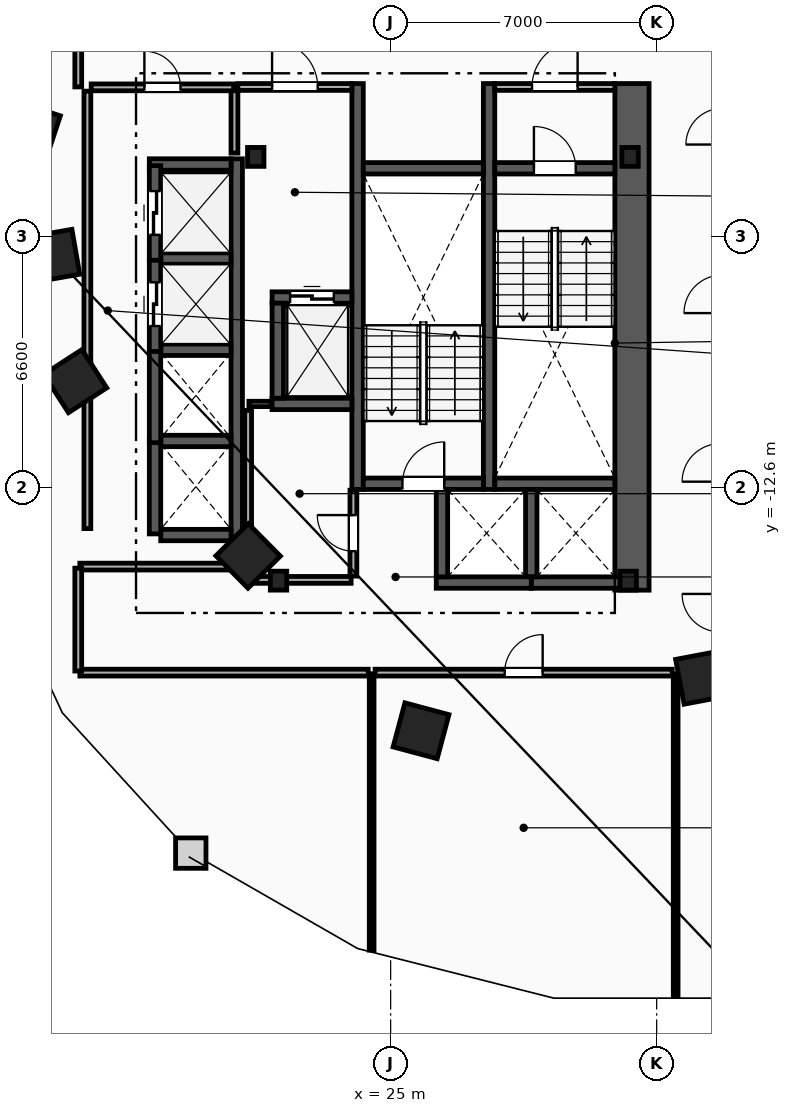
"""IFC4 building model, lengths in metres.
Left out: names, types, materials, properties, quantities, classifications, styles, units other than length and angle.
Written with IfcOpenShell. Run it as: python <this file> out.ifc"""

import sys

from ifc_helpers import new_model, si_unit, direction, frame, frame_2d, origin, origin_2d, place, context, subcontext, project, spatial, rectangle, i_section, extrude, element, fill, save


model = new_model("IFC4")
c1 = context("Model", 3, precision=1e-05, world=origin(), true_north=direction((0.0, 1.0)))
c2 = subcontext(c1, "Body", "Model", "MODEL_VIEW")
j1 = project(units=[si_unit("LENGTHUNIT", "METRE"), si_unit("PLANEANGLEUNIT", "RADIAN")], contexts=[c1])
p1 = place(None, origin())
s1 = spatial("IfcSite", under=j1, at=p1, CompositionType="ELEMENT")
p2 = place(p1, origin())
s2 = spatial("IfcBuilding", under=s1, at=p2, CompositionType="ELEMENT")
p3 = place(p2, frame((0.0, 0.0, 65.8)))
s3 = spatial("IfcBuildingStorey", under=s2, at=p3, CompositionType="ELEMENT", Elevation=65.8)
for number, where, z_axis, x_axis in (
    (1, (31.3, -3.9, 0.0), (0.0, 0.0, 1.0), (1.0, 0.0, 0.0)),
    (2, (21.45, -3.9, 0.0), (0.0, 0.0, 1.0), (1.0, 0.0, 0.0)),
    (3, (22.05, -15.05, 0.0), (0.0, 0.0, 1.0), (1.0, 0.0, 0.0)),
    (4, (31.25, -15.05, 0.0), (0.0, 0.0, 1.0), (1.0, 0.0, 0.0)),
):
    element("IfcColumn", number, at=place(p3, frame(where, z_axis=z_axis, x_axis=x_axis)), inside=s3, PredefinedType="COLUMN", context=c2, shape_type="SweptSolid", body=[
        extrude(i_section(OverallWidth=0.432, OverallDepth=0.498, WebThickness=0.056, FlangeThickness=0.089, FilletRadius=0.018, at=origin_2d()), origin(), (0.0, 0.0, 1.0), 3.8),
    ])
for number, where, z_axis, x_axis in (
    (5, (15.55, -3.2, 0.0), (0.0, 0.0, 1.0), (-0.315, -0.949, 0.0)),
    (6, (16.125, -6.5, 0.0), (0.0, 0.0, 1.0), (0.172, -0.985, 0.0)),
    (7, (16.7, -9.8, 0.0), (0.0, 0.0, 1.0), (0.544, -0.839, 0.0)),
    (8, (21.25, -14.4, 0.0), (0.0, 0.0, 1.0), (0.703, -0.711, 0.0)),
    (9, (25.8, -19.0, 0.0), (0.0, 0.0, 1.0), (0.966, -0.259, 0.0)),
    (10, (33.2, -17.6, 0.0), (0.0, 0.0, 1.0), (0.983, 0.186, 0.0)),
):
    element("IfcColumn", number, at=place(p3, frame(where, z_axis=z_axis, x_axis=x_axis)), inside=s3, PredefinedType="COLUMN", context=c2, shape_type="SweptSolid", body=[
        extrude(rectangle(XDim=1.2, YDim=1.2, at=origin_2d()), origin(), (0.0, 0.0, 1.0), 3.8),
    ])
p4 = place(p3, frame((31.35, -15.3, 0.0), z_axis=(0.0, 0.0, 1.0), x_axis=(0.0, 1.0, 0.0)))
e11 = element("IfcWall", 11, at=p4, inside=s3, PredefinedType="SHEAR", context=c2, shape_type="SweptSolid", body=[
    extrude(rectangle(XDim=13.33, YDim=0.9, at=frame_2d((6.665, 0.0))), origin(), (0.0, 0.0, 1.0), 3.5),
])
for number, where, z_axis, x_axis in (
    (12, (27.59, -12.65, 0.0), (0.0, 0.0, 1.0), (0.0, 1.0, 0.0)),
    (13, (24.13, -12.65, 0.0), (0.0, 0.0, 1.0), (0.0, 1.0, 0.0)),
):
    element("IfcWall", number, at=place(p3, frame(where, z_axis=z_axis, x_axis=x_axis)), inside=s3, PredefinedType="SHEAR", context=c2, shape_type="SweptSolid", body=[
        extrude(rectangle(XDim=10.68, YDim=0.3, at=frame_2d((5.34, 0.0))), origin(), (0.0, 0.0, 1.0), 3.5),
    ])
p5 = place(p3, frame((27.74, -4.2, 0.0), z_axis=(0.0, 0.0, 1.0), x_axis=(1.0, 0.0, 0.0)))
e14 = element("IfcWall", 14, at=p5, inside=s3, PredefinedType="SHEAR", context=c2, shape_type="SweptSolid", body=[
    extrude(rectangle(XDim=3.16, YDim=0.3, at=frame_2d((1.58, 0.0))), origin(), (0.0, 0.0, 1.0), 3.5),
])
p6 = place(p5, frame((1.03, 0.0, 0.0)))
e15 = element("IfcOpeningElement", 15, at=p6, cuts=e14, PredefinedType="OPENING", context=c2, shape_type="SweptSolid", body=[
    extrude(rectangle(XDim=1.1, YDim=2.15, at=frame_2d((0.55, 1.075))), frame((0.0, 0.16, 0.0), z_axis=(0.0, -1.0, 0.0), x_axis=(1.0, 0.0, 0.0)), (0.0, 0.0, 1.0), 0.32),
])
p7 = place(p3, frame((27.74, -12.5, 0.0), z_axis=(0.0, 0.0, 1.0), x_axis=(1.0, 0.0, 0.0)))
e16 = element("IfcWall", 16, at=p7, inside=s3, PredefinedType="SHEAR", context=c2, shape_type="SweptSolid", body=[
    extrude(rectangle(XDim=3.16, YDim=0.3, at=frame_2d((1.58, 0.0))), origin(), (0.0, 0.0, 1.0), 3.5),
])
p8 = place(p3, frame((24.28, -12.5, 0.0), z_axis=(0.0, 0.0, 1.0), x_axis=(1.0, 0.0, 0.0)))
e17 = element("IfcWall", 17, at=p8, inside=s3, PredefinedType="SHEAR", context=c2, shape_type="SweptSolid", body=[
    extrude(rectangle(XDim=3.16, YDim=0.3, at=frame_2d((1.58, 0.0))), origin(), (0.0, 0.0, 1.0), 3.5),
])
p9 = place(p8, frame((1.03, 0.0, 0.0)))
e18 = element("IfcOpeningElement", 18, at=p9, cuts=e17, PredefinedType="OPENING", context=c2, shape_type="SweptSolid", body=[
    extrude(rectangle(XDim=1.1, YDim=2.15, at=frame_2d((0.55, 1.075))), frame((0.0, 0.16, 0.0), z_axis=(0.0, -1.0, 0.0), x_axis=(1.0, 0.0, 0.0)), (0.0, 0.0, 1.0), 0.32),
])
p10 = place(p3, frame((24.28, -4.2, 0.0), z_axis=(0.0, 0.0, 1.0), x_axis=(1.0, 0.0, 0.0)))
e19 = element("IfcWall", 19, at=p10, inside=s3, PredefinedType="SHEAR", context=c2, shape_type="SweptSolid", body=[
    extrude(rectangle(XDim=3.16, YDim=0.3, at=frame_2d((1.58, 0.0))), origin(), (0.0, 0.0, 1.0), 3.5),
])
p11 = place(p3, frame((20.89, -3.8, 0.0), z_axis=(0.0, 0.0, 1.0), x_axis=(0.0, 1.0, 0.0)))
e20 = element("IfcWall", 20, at=p11, inside=s3, PredefinedType="PARTITIONING", context=c2, shape_type="SweptSolid", body=[
    extrude(rectangle(XDim=1.65, YDim=0.18, at=frame_2d((0.825, 0.0))), origin(), (0.0, 0.0, 1.0), 3.5),
])
p12 = place(p3, frame((20.98, -2.06, 0.0), z_axis=(0.0, 0.0, 1.0), x_axis=(1.0, 0.0, 0.0)))
e21 = element("IfcWall", 21, at=p12, inside=s3, PredefinedType="PARTITIONING", context=c2, shape_type="SweptSolid", body=[
    extrude(rectangle(XDim=3.0, YDim=0.18, at=frame_2d((1.5, 0.0))), origin(), (0.0, 0.0, 1.0), 3.5),
])
p13 = place(p12, frame((0.9, 0.0, 0.0)))
e22 = element("IfcOpeningElement", 22, at=p13, cuts=e21, PredefinedType="OPENING", context=c2, shape_type="SweptSolid", body=[
    extrude(rectangle(XDim=1.2, YDim=2.15, at=frame_2d((0.6, 1.075))), frame((0.0, 0.1, 0.0), z_axis=(0.0, -1.0, 0.0), x_axis=(1.0, 0.0, 0.0)), (0.0, 0.0, 1.0), 0.2),
])
p14 = place(p3, frame((27.74, -2.06, 0.0), z_axis=(0.0, 0.0, 1.0), x_axis=(1.0, 0.0, 0.0)))
e23 = element("IfcWall", 23, at=p14, inside=s3, PredefinedType="PARTITIONING", context=c2, shape_type="SweptSolid", body=[
    extrude(rectangle(XDim=3.16, YDim=0.18, at=frame_2d((1.58, 0.0))), origin(), (0.0, 0.0, 1.0), 3.5),
])
p15 = place(p14, frame((0.98, 0.0, 0.0)))
e24 = element("IfcOpeningElement", 24, at=p15, cuts=e23, PredefinedType="OPENING", context=c2, shape_type="SweptSolid", body=[
    extrude(rectangle(XDim=1.2, YDim=2.15, at=frame_2d((0.6, 1.075))), frame((0.0, 0.1, 0.0), z_axis=(0.0, -1.0, 0.0), x_axis=(1.0, 0.0, 0.0)), (0.0, 0.0, 1.0), 0.2),
])
p16 = place(p3, frame((21.88, -7.6, 0.0), z_axis=(0.0, 0.0, 1.0), x_axis=(1.0, 0.0, 0.0)))
e25 = element("IfcWall", 25, at=p16, inside=s3, PredefinedType="SHEAR", context=c2, shape_type="SweptSolid", body=[
    extrude(rectangle(XDim=2.1, YDim=0.3, at=frame_2d((1.05, 0.0))), origin(), (0.0, 0.0, 1.0), 3.5),
])
p17 = place(p16, frame((0.475, 0.0, 0.0)))
e26 = element("IfcOpeningElement", 26, at=p17, cuts=e25, PredefinedType="OPENING", context=c2, shape_type="SweptSolid", body=[
    extrude(rectangle(XDim=1.15, YDim=2.2, at=frame_2d((0.575, 1.1))), frame((0.0, 0.16, 0.0), z_axis=(0.0, -1.0, 0.0), x_axis=(1.0, 0.0, 0.0)), (0.0, 0.0, 1.0), 0.32),
])
p18 = place(p3, frame((21.88, -10.4, 0.0), z_axis=(0.0, 0.0, 1.0), x_axis=(1.0, 0.0, 0.0)))
e27 = element("IfcWall", 27, at=p18, inside=s3, PredefinedType="SHEAR", context=c2, shape_type="SweptSolid", body=[
    extrude(rectangle(XDim=2.1, YDim=0.3, at=frame_2d((1.05, 0.0))), origin(), (0.0, 0.0, 1.0), 3.5),
])
for number, where, z_axis, x_axis in (
    (28, (22.03, -10.25, 0.0), (0.0, 0.0, 1.0), (0.0, 1.0, 0.0)),
    (29, (28.7, -15.1, 0.0), (0.0, 0.0, 1.0), (1.0, 0.0, 0.0)),
):
    element("IfcWall", number, at=place(p3, frame(where, z_axis=z_axis, x_axis=x_axis)), inside=s3, PredefinedType="SHEAR", context=c2, shape_type="SweptSolid", body=[
        extrude(rectangle(XDim=2.5, YDim=0.3, at=frame_2d((1.25, 0.0))), origin(), (0.0, 0.0, 1.0), 3.5),
    ])
p19 = place(p3, frame((28.7, -14.95, 0.0), z_axis=(0.0, 0.0, 1.0), x_axis=(0.0, 1.0, 0.0)))
e30 = element("IfcWall", 30, at=p19, inside=s3, PredefinedType="SHEAR", context=c2, shape_type="SweptSolid", body=[
    extrude(rectangle(XDim=2.3, YDim=0.3, at=frame_2d((1.15, 0.0))), origin(), (0.0, 0.0, 1.0), 3.5),
])
p20 = place(p3, frame((26.2, -15.1, 0.0), z_axis=(0.0, 0.0, 1.0), x_axis=(1.0, 0.0, 0.0)))
e31 = element("IfcWall", 31, at=p20, inside=s3, PredefinedType="SHEAR", context=c2, shape_type="SweptSolid", body=[
    extrude(rectangle(XDim=2.5, YDim=0.3, at=frame_2d((1.25, 0.0))), origin(), (0.0, 0.0, 1.0), 3.5),
])
p21 = place(p3, frame((26.35, -14.95, 0.0), z_axis=(0.0, 0.0, 1.0), x_axis=(0.0, 1.0, 0.0)))
e32 = element("IfcWall", 32, at=p21, inside=s3, PredefinedType="SHEAR", context=c2, shape_type="SweptSolid", body=[
    extrude(rectangle(XDim=2.3, YDim=0.3, at=frame_2d((1.15, 0.0))), origin(), (0.0, 0.0, 1.0), 3.5),
])
p22 = place(p3, frame((20.95, -14.0, 0.0), z_axis=(0.0, 0.0, 1.0), x_axis=(0.0, 1.0, 0.0)))
e33 = element("IfcWall", 33, at=p22, inside=s3, PredefinedType="SHEAR", context=c2, shape_type="SweptSolid", body=[
    extrude(rectangle(XDim=10.05, YDim=0.3, at=frame_2d((5.025, 0.0))), origin(), (0.0, 0.0, 1.0), 3.5),
])
p23 = place(p3, frame((18.95, -13.85, 0.0), z_axis=(0.0, 0.0, 1.0), x_axis=(1.0, 0.0, 0.0)))
e34 = element("IfcWall", 34, at=p23, inside=s3, PredefinedType="SHEAR", context=c2, shape_type="SweptSolid", body=[
    extrude(rectangle(XDim=1.85, YDim=0.3, at=frame_2d((0.925, 0.0))), origin(), (0.0, 0.0, 1.0), 3.5),
])
p24 = place(p3, frame((18.65, -4.1, 0.0), z_axis=(0.0, 0.0, 1.0), x_axis=(1.0, 0.0, 0.0)))
e35 = element("IfcWall", 35, at=p24, inside=s3, PredefinedType="SHEAR", context=c2, shape_type="SweptSolid", body=[
    extrude(rectangle(XDim=2.15, YDim=0.3, at=frame_2d((1.075, 0.0))), origin(), (0.0, 0.0, 1.0), 3.5),
])
for number, where, z_axis, x_axis in (
    (36, (18.95, -11.375, 0.0), (0.0, 0.0, 1.0), (1.0, 0.0, 0.0)),
    (37, (18.95, -8.975, 0.0), (0.0, 0.0, 1.0), (1.0, 0.0, 0.0)),
    (38, (18.95, -6.575, 0.0), (0.0, 0.0, 1.0), (1.0, 0.0, 0.0)),
):
    element("IfcWall", number, at=place(p3, frame(where, z_axis=z_axis, x_axis=x_axis)), inside=s3, PredefinedType="SHEAR", context=c2, shape_type="SweptSolid", body=[
        extrude(rectangle(XDim=1.85, YDim=0.3, at=frame_2d((0.925, 0.0))), origin(), (0.0, 0.0, 1.0), 3.5),
    ])
for number, where, z_axis, x_axis in (
    (39, (18.8, -13.82, 0.0), (0.0, 0.0, 1.0), (0.0, 1.0, 0.0)),
    (40, (18.8, -11.42, 0.0), (0.0, 0.0, 1.0), (0.0, 1.0, 0.0)),
):
    element("IfcWall", number, at=place(p3, frame(where, z_axis=z_axis, x_axis=x_axis)), inside=s3, PredefinedType="SHEAR", context=c2, shape_type="SweptSolid", body=[
        extrude(rectangle(XDim=2.49, YDim=0.3, at=frame_2d((1.245, 0.0))), origin(), (0.0, 0.0, 1.0), 3.5),
    ])
p25 = place(p3, frame((18.8, -9.02, 0.0), z_axis=(0.0, 0.0, 1.0), x_axis=(0.0, 1.0, 0.0)))
e41 = element("IfcWall", 41, at=p25, inside=s3, PredefinedType="SHEAR", context=c2, shape_type="SweptSolid", body=[
    extrude(rectangle(XDim=2.49, YDim=0.3, at=frame_2d((1.245, 0.0))), origin(), (0.0, 0.0, 1.0), 3.5),
])
p26 = place(p25, frame((0.67, 0.0, 0.0)))
e42 = element("IfcOpeningElement", 42, at=p26, cuts=e41, PredefinedType="OPENING", context=c2, shape_type="SweptSolid", body=[
    extrude(rectangle(XDim=1.15, YDim=2.2, at=frame_2d((0.575, 1.1))), frame((0.0, 0.16, 0.0), z_axis=(0.0, -1.0, 0.0), x_axis=(1.0, 0.0, 0.0)), (0.0, 0.0, 1.0), 0.32),
])
p27 = place(p3, frame((18.8, -6.62, 0.0), z_axis=(0.0, 0.0, 1.0), x_axis=(0.0, 1.0, 0.0)))
e43 = element("IfcWall", 43, at=p27, inside=s3, PredefinedType="SHEAR", context=c2, shape_type="SweptSolid", body=[
    extrude(rectangle(XDim=2.49, YDim=0.3, at=frame_2d((1.245, 0.0))), origin(), (0.0, 0.0, 1.0), 3.5),
])
p28 = place(p27, frame((0.67, 0.0, 0.0)))
e44 = element("IfcOpeningElement", 44, at=p28, cuts=e43, PredefinedType="OPENING", context=c2, shape_type="SweptSolid", body=[
    extrude(rectangle(XDim=1.15, YDim=2.2, at=frame_2d((0.575, 1.1))), frame((0.0, 0.16, 0.0), z_axis=(0.0, -1.0, 0.0), x_axis=(1.0, 0.0, 0.0)), (0.0, 0.0, 1.0), 0.32),
])
p29 = place(p3, frame((17.02, -13.68, 0.0), z_axis=(0.0, 0.0, 1.0), x_axis=(0.0, 1.0, 0.0)))
e45 = element("IfcWall", 45, at=p29, inside=s3, PredefinedType="PARTITIONING", context=c2, shape_type="SweptSolid", body=[
    extrude(rectangle(XDim=11.51, YDim=0.18, at=frame_2d((5.755, 0.0))), origin(), (0.0, 0.0, 1.0), 3.5),
])
p30 = place(p3, frame((17.12, -2.07, 0.0), z_axis=(0.0, 0.0, 1.0), x_axis=(1.0, 0.0, 0.0)))
e46 = element("IfcWall", 46, at=p30, inside=s3, PredefinedType="PARTITIONING", context=c2, shape_type="SweptSolid", body=[
    extrude(rectangle(XDim=3.75, YDim=0.18, at=frame_2d((1.875, 0.0))), origin(), (0.0, 0.0, 1.0), 3.5),
])
p31 = place(p30, frame((1.4, 0.0, 0.0)))
e47 = element("IfcOpeningElement", 47, at=p31, cuts=e46, PredefinedType="OPENING", context=c2, shape_type="SweptSolid", body=[
    extrude(rectangle(XDim=0.95, YDim=2.1, at=frame_2d((0.475, 1.05))), frame((0.0, 0.1, 0.0), z_axis=(0.0, -1.0, 0.0), x_axis=(1.0, 0.0, 0.0)), (0.0, 0.0, 1.0), 0.2),
])
p32 = place(p3, frame((21.27, -10.4, 0.0), z_axis=(0.0, 0.0, 1.0), x_axis=(1.0, 0.0, 0.0)))
e48 = element("IfcWall", 48, at=p32, inside=s3, PredefinedType="PARTITIONING", context=c2, shape_type="SweptSolid", body=[
    extrude(rectangle(XDim=0.59, YDim=0.14, at=frame_2d((0.295, 0.0))), origin(), (0.0, 0.0, 1.0), 3.5),
])
p33 = place(p3, frame((21.25, -14.93, 0.0), z_axis=(0.0, 0.0, 1.0), x_axis=(0.0, 1.0, 0.0)))
e49 = element("IfcWall", 49, at=p33, inside=s3, PredefinedType="PARTITIONING", context=c2, shape_type="SweptSolid", body=[
    extrude(rectangle(XDim=4.36, YDim=0.18, at=frame_2d((2.18, 0.0))), origin(), (0.0, 0.0, 1.0), 3.5),
])
p34 = place(p3, frame((21.35, -15.03, 0.0), z_axis=(0.0, 0.0, 1.0), x_axis=(1.0, 0.0, 0.0)))
e50 = element("IfcWall", 50, at=p34, inside=s3, PredefinedType="PARTITIONING", context=c2, shape_type="SweptSolid", body=[
    extrude(rectangle(XDim=2.61, YDim=0.18, at=frame_2d((1.305, 0.0))), origin(), (0.0, 0.0, 1.0), 2.573),
])
p35 = place(p3, frame((24.02, -14.93, 0.0), z_axis=(0.0, 0.0, 1.0), x_axis=(0.0, 1.0, 0.0)))
e51 = element("IfcWall", 51, at=p35, inside=s3, PredefinedType="PARTITIONING", context=c2, shape_type="SweptSolid", body=[
    extrude(rectangle(XDim=2.26, YDim=0.18, at=frame_2d((1.13, 0.0))), origin(), (0.0, 0.0, 1.0), 3.5),
])
p36 = place(p35, frame((0.655, 0.0, 0.0)))
e52 = element("IfcOpeningElement", 52, at=p36, cuts=e51, PredefinedType="OPENING", context=c2, shape_type="SweptSolid", body=[
    extrude(rectangle(XDim=0.95, YDim=2.1, at=frame_2d((0.475, 1.05))), frame((0.0, 0.1, 0.0), z_axis=(0.0, -1.0, 0.0), x_axis=(1.0, 0.0, 0.0)), (0.0, 0.0, 1.0), 0.2),
])
p37 = place(p3, frame((24.5, -24.772, 0.0), z_axis=(0.0, 0.0, 1.0), x_axis=(0.0, 1.0, 0.0)))
e53 = element("IfcWall", 53, at=p37, inside=s3, PredefinedType="PARTITIONING", context=c2, shape_type="SweptSolid", body=[
    extrude(rectangle(XDim=7.272, YDim=0.125, at=frame_2d((3.636, 0.0))), origin(), (0.0, 0.0, 1.0), 3.5),
])
p38 = place(p3, frame((32.5, -25.985, 0.0), z_axis=(0.0, 0.0, 1.0), x_axis=(0.0, 1.0, 0.0)))
e54 = element("IfcWall", 54, at=p38, inside=s3, PredefinedType="PARTITIONING", context=c2, shape_type="SweptSolid", body=[
    extrude(rectangle(XDim=8.485, YDim=0.125, at=frame_2d((4.243, 0.0))), origin(), (0.0, 0.0, 1.0), 3.5),
])
p39 = place(p3, frame((24.59, -17.47, 0.0), z_axis=(0.0, 0.0, 1.0), x_axis=(1.0, 0.0, 0.0)))
e55 = element("IfcWall", 55, at=p39, inside=s3, PredefinedType="PARTITIONING", context=c2, shape_type="SweptSolid", body=[
    extrude(rectangle(XDim=7.82, YDim=0.18, at=frame_2d((3.91, 0.0))), origin(), (0.0, 0.0, 1.0), 3.5),
])
p40 = place(p39, frame((3.41, 0.0, 0.0)))
e56 = element("IfcOpeningElement", 56, at=p40, cuts=e55, PredefinedType="OPENING", context=c2, shape_type="SweptSolid", body=[
    extrude(rectangle(XDim=1.0, YDim=2.15, at=frame_2d((0.5, 1.075))), frame((0.0, 0.1, 0.0), z_axis=(0.0, -1.0, 0.0), x_axis=(1.0, 0.0, 0.0)), (0.0, 0.0, 1.0), 0.2),
])
p41 = place(p3, frame((32.59, -17.47, 0.0), z_axis=(0.0, 0.0, 1.0), x_axis=(1.0, 0.0, 0.0)))
e57 = element("IfcWall", 57, at=p41, inside=s3, PredefinedType="PARTITIONING", context=c2, shape_type="SweptSolid", body=[
    extrude(rectangle(XDim=1.038, YDim=0.18, at=frame_2d((0.519, 0.0))), origin(), (0.0, 0.0, 1.0), 3.5),
])
p42 = place(p3, frame((16.822, -17.47, 0.0), z_axis=(0.0, 0.0, 1.0), x_axis=(1.0, 0.0, 0.0)))
e58 = element("IfcWall", 58, at=p42, inside=s3, PredefinedType="PARTITIONING", context=c2, shape_type="SweptSolid", body=[
    extrude(rectangle(XDim=7.588, YDim=0.18, at=frame_2d((3.794, 0.0))), origin(), (0.0, 0.0, 1.0), 3.5),
])
p43 = place(p3, frame((21.178, -14.68, 0.0), z_axis=(0.0, 0.0, 1.0), x_axis=(-1.0, 0.0, 0.0)))
e59 = element("IfcWall", 59, at=p43, inside=s3, PredefinedType="PARTITIONING", context=c2, shape_type="SweptSolid", body=[
    extrude(rectangle(XDim=4.357, YDim=0.18, at=frame_2d((2.178, 0.0))), origin(), (0.0, 0.0, 1.0), 3.5),
])
p44 = place(p3, frame((16.78, -14.721, 0.0), z_axis=(0.0, 0.0, 1.0), x_axis=(0.0, -1.0, 0.0)))
e60 = element("IfcWall", 60, at=p44, inside=s3, PredefinedType="PARTITIONING", context=c2, shape_type="SweptSolid", body=[
    extrude(rectangle(XDim=2.707, YDim=0.18, at=frame_2d((1.354, 0.0))), origin(), (0.0, 0.0, 1.0), 3.5),
])
p45 = place(p3, frame((16.78, 0.329, 0.0), z_axis=(0.0, 0.0, 1.0), x_axis=(0.0, -1.0, 0.0)))
e61 = element("IfcWall", 61, at=p45, inside=s3, PredefinedType="PARTITIONING", context=c2, shape_type="SweptSolid", body=[
    extrude(rectangle(XDim=2.387, YDim=0.18, at=frame_2d((1.194, 0.0))), origin(), (0.0, 0.0, 1.0), 3.5),
])
p46 = place(p6, origin())
e62 = element("IfcDoor", 62, at=p46, inside=s3, OperationType="SINGLE_SWING_LEFT", PredefinedType="DOOR", context=c2, shape_type="SweptSolid", body=[
    extrude(rectangle(XDim=1.1, YDim=2.15, at=frame_2d((0.55, 1.075))), frame((0.0, 0.025, 0.0), z_axis=(0.0, -1.0, 0.0), x_axis=(1.0, 0.0, 0.0)), (0.0, 0.0, 1.0), 0.05),
])
fill(e15, e62)
p47 = place(p9, origin())
e63 = element("IfcDoor", 63, at=p47, inside=s3, OperationType="SINGLE_SWING_RIGHT", PredefinedType="DOOR", context=c2, shape_type="SweptSolid", body=[
    extrude(rectangle(XDim=1.1, YDim=2.15, at=frame_2d((0.55, 1.075))), frame((0.0, 0.025, 0.0), z_axis=(0.0, -1.0, 0.0), x_axis=(1.0, 0.0, 0.0)), (0.0, 0.0, 1.0), 0.05),
])
fill(e18, e63)
p48 = place(p13, origin())
e64 = element("IfcDoor", 64, at=p48, inside=s3, OperationType="SINGLE_SWING_LEFT", PredefinedType="DOOR", context=c2, shape_type="SweptSolid", body=[
    extrude(rectangle(XDim=1.2, YDim=2.15, at=frame_2d((0.6, 1.075))), frame((0.0, 0.025, 0.0), z_axis=(0.0, -1.0, 0.0), x_axis=(1.0, 0.0, 0.0)), (0.0, 0.0, 1.0), 0.05),
])
fill(e22, e64)
p49 = place(p15, origin())
e65 = element("IfcDoor", 65, at=p49, inside=s3, OperationType="SINGLE_SWING_RIGHT", PredefinedType="DOOR", context=c2, shape_type="SweptSolid", body=[
    extrude(rectangle(XDim=1.2, YDim=2.15, at=frame_2d((0.6, 1.075))), frame((0.0, 0.025, 0.0), z_axis=(0.0, -1.0, 0.0), x_axis=(1.0, 0.0, 0.0)), (0.0, 0.0, 1.0), 0.05),
])
fill(e24, e65)
p50 = place(p17, origin())
e66 = element("IfcDoor", 66, at=p50, inside=s3, OperationType="SLIDING_TO_LEFT", PredefinedType="TRAPDOOR", context=c2, shape_type="SweptSolid", body=[
    extrude(rectangle(XDim=1.15, YDim=2.2, at=frame_2d((0.575, 1.1))), frame((0.0, 0.025, 0.0), z_axis=(0.0, -1.0, 0.0), x_axis=(1.0, 0.0, 0.0)), (0.0, 0.0, 1.0), 0.05),
])
fill(e26, e66)
p51 = place(p26, origin())
e67 = element("IfcDoor", 67, at=p51, inside=s3, OperationType="SLIDING_TO_LEFT", PredefinedType="TRAPDOOR", context=c2, shape_type="SweptSolid", body=[
    extrude(rectangle(XDim=1.15, YDim=2.2, at=frame_2d((0.575, 1.1))), frame((0.0, 0.025, 0.0), z_axis=(0.0, -1.0, 0.0), x_axis=(1.0, 0.0, 0.0)), (0.0, 0.0, 1.0), 0.05),
])
fill(e42, e67)
p52 = place(p28, origin())
e68 = element("IfcDoor", 68, at=p52, inside=s3, OperationType="SLIDING_TO_LEFT", PredefinedType="TRAPDOOR", context=c2, shape_type="SweptSolid", body=[
    extrude(rectangle(XDim=1.15, YDim=2.2, at=frame_2d((0.575, 1.1))), frame((0.0, 0.025, 0.0), z_axis=(0.0, -1.0, 0.0), x_axis=(1.0, 0.0, 0.0)), (0.0, 0.0, 1.0), 0.05),
])
fill(e44, e68)
p53 = place(p40, origin())
e69 = element("IfcDoor", 69, at=p53, inside=s3, OperationType="SINGLE_SWING_RIGHT", PredefinedType="DOOR", context=c2, shape_type="SweptSolid", body=[
    extrude(rectangle(XDim=1.0, YDim=2.15, at=frame_2d((0.5, 1.075))), frame((0.0, 0.025, 0.0), z_axis=(0.0, -1.0, 0.0), x_axis=(1.0, 0.0, 0.0)), (0.0, 0.0, 1.0), 0.05),
])
fill(e56, e69)
p54 = place(p31, origin())
e70 = element("IfcDoor", 70, at=p54, inside=s3, OperationType="SINGLE_SWING_LEFT", PredefinedType="DOOR", context=c2, shape_type="SweptSolid", body=[
    extrude(rectangle(XDim=0.95, YDim=2.1, at=frame_2d((0.475, 1.05))), frame((0.0, 0.025, 0.0), z_axis=(0.0, -1.0, 0.0), x_axis=(1.0, 0.0, 0.0)), (0.0, 0.0, 1.0), 0.05),
])
fill(e47, e70)
p55 = place(p36, origin())
e71 = element("IfcDoor", 71, at=p55, inside=s3, OperationType="SINGLE_SWING_RIGHT", PredefinedType="DOOR", context=c2, shape_type="SweptSolid", body=[
    extrude(rectangle(XDim=0.95, YDim=2.1, at=frame_2d((0.475, 1.05))), frame((0.0, 0.025, 0.0), z_axis=(0.0, -1.0, 0.0), x_axis=(1.0, 0.0, 0.0)), (0.0, 0.0, 1.0), 0.05),
])
fill(e52, e71)
save(model, sys.argv[1])
